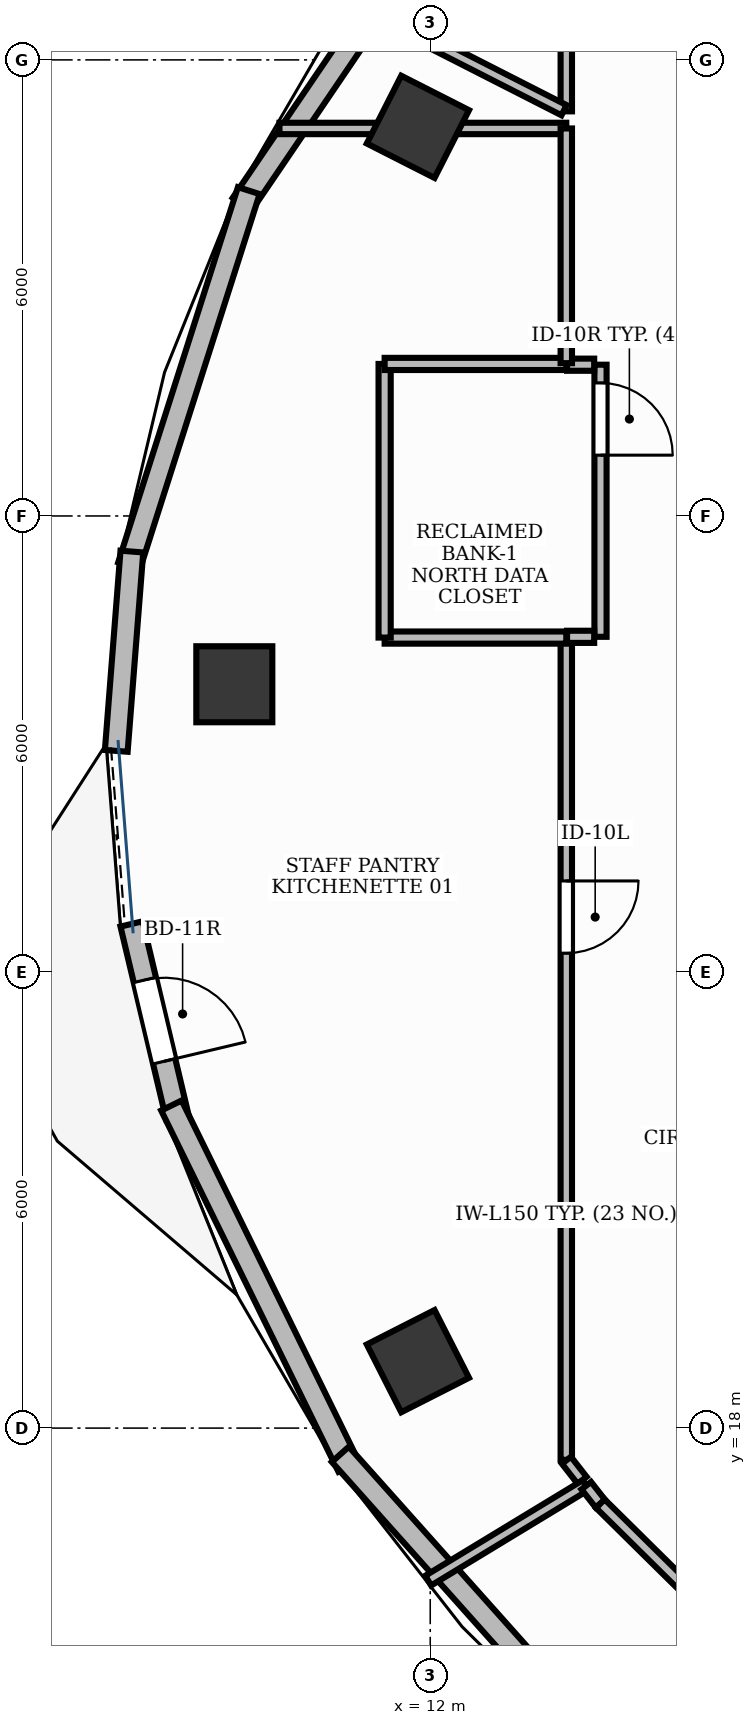
"""IFC4 building model, lengths in metres.
Left out: names, types, materials, properties, quantities, classifications, styles, units other than length and angle.
Written with IfcOpenShell. Run it as: python <this file> out.ifc"""

import sys

from ifc_helpers import new_model, si_unit, direction, frame, frame_2d, origin, origin_2d, place, context, subcontext, project, spatial, rectangle, extrude, element, fill, save


model = new_model("IFC4")
c1 = context("Model", 3, precision=1e-05, world=origin(), true_north=direction((0.0, 1.0)))
c2 = subcontext(c1, "Body", "Model", "MODEL_VIEW")
j1 = project(units=[si_unit("LENGTHUNIT", "METRE"), si_unit("PLANEANGLEUNIT", "RADIAN")], contexts=[c1])
p1 = place(None, origin())
s1 = spatial("IfcSite", under=j1, at=p1, CompositionType="ELEMENT")
p2 = place(p1, origin())
s2 = spatial("IfcBuilding", under=s1, at=p2, CompositionType="ELEMENT")
p3 = place(p2, frame((0.0, 0.0, 175.2)))
s3 = spatial("IfcBuildingStorey", under=s2, at=p3, CompositionType="ELEMENT", Elevation=175.2)
for number, where, z_axis, x_axis in (
    (1, (11.838, 35.119, -0.0), (0.0, 0.0, 1.0), (0.453, 0.891, 0.0)),
    (2, (9.423, 27.786, -0.0), (0.0, 0.0, 1.0), (0.0, 1.0, 0.0)),
    (3, (11.838, 18.881, -0.0), (0.0, 0.0, 1.0), (-0.453, 0.891, 0.0)),
):
    element("IfcColumn", number, at=place(p3, frame(where, z_axis=z_axis, x_axis=x_axis)), inside=s3, PredefinedType="COLUMN", context=c2, shape_type="SweptSolid", body=[
        extrude(rectangle(XDim=1.0, YDim=1.0, at=origin_2d()), origin(), (0.0, 0.0, 1.0), 3.901),
    ])
p4 = place(p3, frame((8.071, 24.633, 0.0), z_axis=(0.0, 0.0, 1.0), x_axis=(0.230740941285, -0.973015219827, 0.0)))
e4 = element("IfcWall", 4, at=p4, inside=s3, PredefinedType="STANDARD", context=c2, shape_type="SweptSolid", body=[
    extrude(rectangle(XDim=2.615, YDim=0.3, at=frame_2d((1.307, 0.0))), origin(), (0.0, 0.0, 1.0), 3.9),
])
p5 = place(p4, frame((0.757, 0.0, 0.0)))
e5 = element("IfcOpeningElement", 5, at=p5, cuts=e4, PredefinedType="OPENING", context=c2, shape_type="SweptSolid", body=[
    extrude(rectangle(XDim=1.1, YDim=2.15, at=frame_2d((0.55, 1.075))), frame((0.0, 0.165, 0.0), z_axis=(0.0, -1.0, 0.0), x_axis=(1.0, 0.0, 0.0)), (0.0, 0.0, 1.0), 0.33),
])
p6 = place(p3, frame((12.58, 38.601, 0.0), z_axis=(0.0, 0.0, 1.0), x_axis=(-0.561663900064, -0.827365495634, 0.0)))
e6 = element("IfcWall", 6, at=p6, inside=s3, PredefinedType="STANDARD", context=c2, shape_type="SweptSolid", body=[
    extrude(rectangle(XDim=5.438, YDim=0.3, at=frame_2d((2.719, 0.0))), origin(), (0.0, 0.0, 1.0), 3.47),
])
p7 = place(p3, frame((9.613, 34.28, 0.0), z_axis=(0.0, 0.0, 1.0), x_axis=(-0.303930984078, -0.952694052106, 0.0)))
e7 = element("IfcWall", 7, at=p7, inside=s3, PredefinedType="STANDARD", context=c2, shape_type="SweptSolid", body=[
    extrude(rectangle(XDim=5.181, YDim=0.3, at=frame_2d((2.591, 0.0))), origin(), (0.0, 0.0, 1.0), 3.47),
])
p8 = place(p3, frame((8.075, 29.531, 0.0), z_axis=(0.0, 0.0, 1.0), x_axis=(-0.078059201014, -0.99694872543, 0.0)))
e8 = element("IfcWall", 8, at=p8, inside=s3, PredefinedType="STANDARD", context=c2, shape_type="SweptSolid", body=[
    extrude(rectangle(XDim=2.63, YDim=0.3, at=frame_2d((1.315, 0.0))), origin(), (0.0, 0.0, 1.0), 3.47),
])
p9 = place(p3, frame((8.595, 22.244, 0.0), z_axis=(0.0, 0.0, 1.0), x_axis=(0.440559663002, -0.897723333403, 0.0)))
e9 = element("IfcWall", 9, at=p9, inside=s3, PredefinedType="STANDARD", context=c2, shape_type="SweptSolid", body=[
    extrude(rectangle(XDim=5.293, YDim=0.3, at=frame_2d((2.647, 0.0))), origin(), (0.0, 0.0, 1.0), 3.9),
])
p10 = place(p3, frame((10.817, 17.655, 0.0), z_axis=(0.0, 0.0, 1.0), x_axis=(0.665771576384, -0.74615561921, 0.0)))
e10 = element("IfcWall", 10, at=p10, inside=s3, PredefinedType="STANDARD", context=c2, shape_type="SweptSolid", body=[
    extrude(rectangle(XDim=5.604, YDim=0.3, at=frame_2d((2.802, 0.0))), origin(), (0.0, 0.0, 1.0), 3.9),
])
p11 = place(p3, frame((14.24, 31.99, 0.0), z_axis=(0.0, 0.0, 1.0), x_axis=(0.0, -1.0, 0.0)))
e11 = element("IfcWall", 11, at=p11, inside=s3, PredefinedType="PARTITIONING", context=c2, shape_type="SweptSolid", body=[
    extrude(rectangle(XDim=3.58, YDim=0.16, at=frame_2d((1.79, 0.0))), origin(), (0.0, 0.0, 1.0), 2.91),
])
p12 = place(p11, frame((0.24, 0.0, 0.0)))
e12 = element("IfcOpeningElement", 12, at=p12, cuts=e11, PredefinedType="OPENING", context=c2, shape_type="SweptSolid", body=[
    extrude(rectangle(XDim=0.95, YDim=2.15, at=frame_2d((0.475, 1.075))), frame((0.0, 0.095, 0.0), z_axis=(0.0, -1.0, 0.0), x_axis=(1.0, 0.0, 0.0)), (0.0, 0.0, 1.0), 0.19),
])
p13 = place(p3, frame((13.79, 28.39, 0.0), z_axis=(0.0, 0.0, 1.0), x_axis=(0.0, -1.0, 0.0)))
e13 = element("IfcWall", 13, at=p13, inside=s3, PredefinedType="PARTITIONING", context=c2, shape_type="SweptSolid", body=[
    extrude(rectangle(XDim=10.807, YDim=0.15, at=frame_2d((5.404, 0.0))), origin(), (0.0, 0.0, 1.0), 2.91),
])
p14 = place(p13, frame((3.192, 0.0, 0.0)))
e14 = element("IfcOpeningElement", 14, at=p14, cuts=e13, PredefinedType="OPENING", context=c2, shape_type="SweptSolid", body=[
    extrude(rectangle(XDim=0.95, YDim=2.15, at=frame_2d((0.475, 1.075))), frame((0.0, 0.09, 0.0), z_axis=(0.0, -1.0, 0.0), x_axis=(1.0, 0.0, 0.0)), (0.0, 0.0, 1.0), 0.18),
])
for number, where, z_axis, x_axis in (
    (15, (13.8, 31.99, 0.0), (0.0, 0.0, 1.0), (1.0, 0.0, 0.0)),
    (16, (14.157, 28.41, 0.0), (0.0, 0.0, 1.0), (-1.0, 0.0, 0.0)),
):
    element("IfcWall", number, at=place(p3, frame(where, z_axis=z_axis, x_axis=x_axis)), inside=s3, PredefinedType="PARTITIONING", context=c2, shape_type="SweptSolid", body=[
        extrude(rectangle(XDim=0.357, YDim=0.16, at=frame_2d((0.178, 0.0))), origin(), (0.0, 0.0, 1.0), 2.91),
    ])
p15 = place(p3, frame((13.79, 28.4, 0.0), z_axis=(0.0, 0.0, 1.0), x_axis=(-1.0, 0.0, 0.0)))
e17 = element("IfcWall", 17, at=p15, inside=s3, PredefinedType="PARTITIONING", context=c2, shape_type="SweptSolid", body=[
    extrude(rectangle(XDim=2.39, YDim=0.16, at=frame_2d((1.195, 0.0))), origin(), (0.0, 0.0, 1.0), 2.91),
])
p16 = place(p3, frame((11.4, 28.4, 0.0), z_axis=(0.0, 0.0, 1.0), x_axis=(0.0, 1.0, 0.0)))
e18 = element("IfcWall", 18, at=p16, inside=s3, PredefinedType="PARTITIONING", context=c2, shape_type="SweptSolid", body=[
    extrude(rectangle(XDim=3.6, YDim=0.16, at=frame_2d((1.8, 0.0))), origin(), (0.0, 0.0, 1.0), 2.91),
])
p17 = place(p3, frame((11.4, 32.0, 0.0), z_axis=(0.0, 0.0, 1.0), x_axis=(1.0, 0.0, 0.0)))
e19 = element("IfcWall", 19, at=p17, inside=s3, PredefinedType="PARTITIONING", context=c2, shape_type="SweptSolid", body=[
    extrude(rectangle(XDim=2.39, YDim=0.16, at=frame_2d((1.195, 0.0))), origin(), (0.0, 0.0, 1.0), 2.91),
])
p18 = place(p3, frame((10.016, 35.098, 0.0), z_axis=(0.0, 0.0, 1.0), x_axis=(1.0, 0.0, 0.0)))
e20 = element("IfcWall", 20, at=p18, inside=s3, PredefinedType="PARTITIONING", context=c2, shape_type="SweptSolid", body=[
    extrude(rectangle(XDim=3.774, YDim=0.15, at=frame_2d((1.887, 0.0))), origin(), (0.0, 0.0, 1.0), 2.91),
])
p19 = place(p3, frame((13.79, 35.098, 0.0), z_axis=(0.0, 0.0, 1.0), x_axis=(0.0, -1.0, 0.0)))
e21 = element("IfcWall", 21, at=p19, inside=s3, PredefinedType="PARTITIONING", context=c2, shape_type="SweptSolid", body=[
    extrude(rectangle(XDim=3.088, YDim=0.15, at=frame_2d((1.544, 0.0))), origin(), (0.0, 0.0, 1.0), 2.91),
])
p20 = place(p3, frame((13.792, 17.576, 0.0), z_axis=(0.0, 0.0, 1.0), x_axis=(0.61611141045, -0.78765901881, 0.0)))
e22 = element("IfcWall", 22, at=p20, inside=s3, PredefinedType="PARTITIONING", context=c2, shape_type="SweptSolid", body=[
    extrude(rectangle(XDim=0.334, YDim=0.15, at=frame_2d((0.167, 0.0))), origin(), (0.0, 0.0, 1.0), 2.91),
])
p21 = place(p3, frame((14.046, 17.251, 0.0), z_axis=(0.0, 0.0, 1.0), x_axis=(-0.854959737725, -0.518694367494, 0.0)))
e23 = element("IfcWall", 23, at=p21, inside=s3, PredefinedType="PARTITIONING", context=c2, shape_type="SweptSolid", body=[
    extrude(rectangle(XDim=2.425, YDim=0.15, at=frame_2d((1.212, 0.0))), origin(), (0.0, 0.0, 1.0), 2.91),
])
p22 = place(p3, frame((14.052, 17.243, 0.0), z_axis=(0.0, 0.0, 1.0), x_axis=(0.615628260214, -0.788036702969, 0.0)))
e24 = element("IfcWall", 24, at=p22, inside=s3, PredefinedType="PARTITIONING", context=c2, shape_type="SweptSolid", body=[
    extrude(rectangle(XDim=0.3, YDim=0.16, at=frame_2d((0.15, 0.0))), origin(), (0.0, 0.0, 1.0), 2.91),
])
p23 = place(p3, frame((14.238, 17.006, 0.0), z_axis=(0.0, 0.0, 1.0), x_axis=(0.711447157113, -0.702739598027, 0.0)))
e25 = element("IfcWall", 25, at=p23, inside=s3, PredefinedType="PARTITIONING", context=c2, shape_type="SweptSolid", body=[
    extrude(rectangle(XDim=2.467, YDim=0.16, at=frame_2d((1.234, 0.0))), origin(), (0.0, 0.0, 1.0), 2.91),
])
p24 = place(p3, frame((13.79, 36.417, 0.0), z_axis=(0.0, 0.0, 1.0), x_axis=(0.0, -1.0, 0.0)))
e26 = element("IfcWall", 26, at=p24, inside=s3, PredefinedType="PARTITIONING", context=c2, shape_type="SweptSolid", body=[
    extrude(rectangle(XDim=1.094, YDim=0.15, at=frame_2d((0.547, 0.0))), origin(), (0.0, 0.0, 1.0), 2.91),
])
p25 = place(p3, frame((13.76, 35.338, 0.0), z_axis=(0.0, 0.0, 1.0), x_axis=(-0.890989702295, 0.454023513053, 0.0)))
e27 = element("IfcWall", 27, at=p25, inside=s3, PredefinedType="PARTITIONING", context=c2, shape_type="SweptSolid", body=[
    extrude(rectangle(XDim=3.106, YDim=0.15, at=frame_2d((1.553, 0.0))), origin(), (0.0, 0.0, 1.0), 2.91),
])
p26 = place(p5, origin())
e28 = element("IfcDoor", 28, at=p26, inside=s3, OperationType="SINGLE_SWING_RIGHT", PredefinedType="DOOR", context=c2, shape_type="SweptSolid", body=[
    extrude(rectangle(XDim=1.1, YDim=2.15, at=frame_2d((0.55, 1.075))), frame((0.0, 0.025, 0.0), z_axis=(0.0, -1.0, 0.0), x_axis=(1.0, 0.0, 0.0)), (0.0, 0.0, 1.0), 0.05),
])
fill(e5, e28)
p27 = place(p12, origin())
e29 = element("IfcDoor", 29, at=p27, inside=s3, OperationType="SINGLE_SWING_RIGHT", PredefinedType="DOOR", context=c2, shape_type="SweptSolid", body=[
    extrude(rectangle(XDim=0.95, YDim=2.15, at=frame_2d((0.475, 1.075))), frame((0.0, 0.025, 0.0), z_axis=(0.0, -1.0, 0.0), x_axis=(1.0, 0.0, 0.0)), (0.0, 0.0, 1.0), 0.05),
])
fill(e12, e29)
p28 = place(p14, origin())
e30 = element("IfcDoor", 30, at=p28, inside=s3, OperationType="SINGLE_SWING_LEFT", PredefinedType="DOOR", context=c2, shape_type="SweptSolid", body=[
    extrude(rectangle(XDim=0.95, YDim=2.15, at=frame_2d((0.475, 1.075))), frame((0.0, 0.025, 0.0), z_axis=(0.0, -1.0, 0.0), x_axis=(1.0, 0.0, 0.0)), (0.0, 0.0, 1.0), 0.05),
])
fill(e14, e30)
save(model, sys.argv[1])
